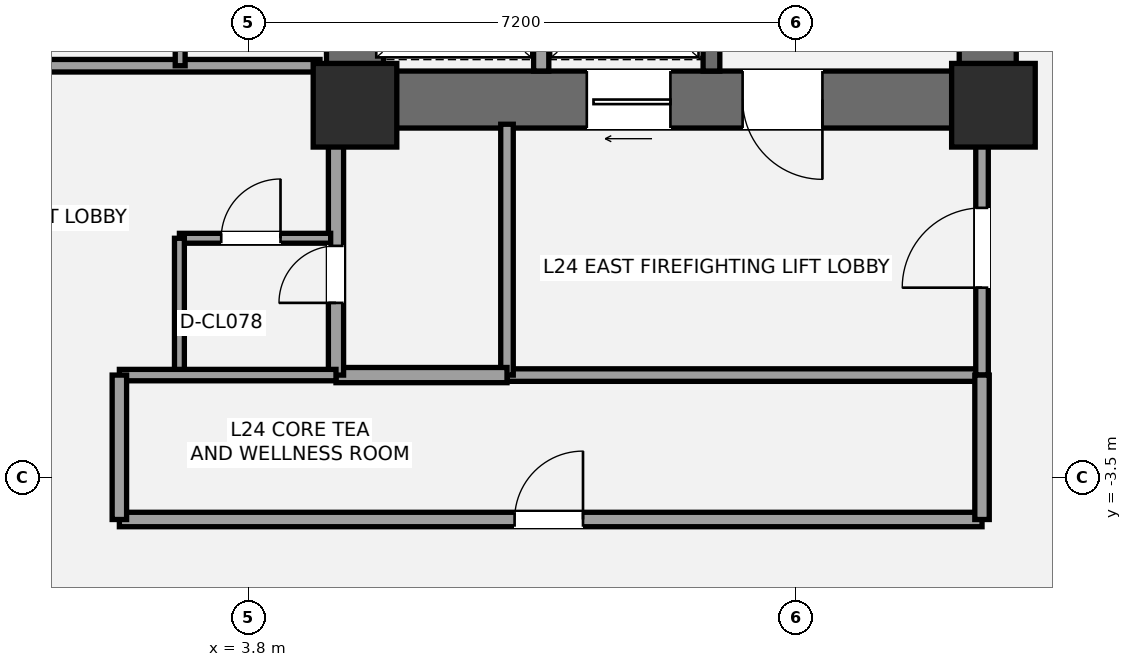
"""IFC4 building model, lengths in metres.
Left out: names, types, materials, properties, quantities, classifications, styles, units other than length and angle.
Written with IfcOpenShell. Run it as: python <this file> out.ifc"""

import sys

from ifc_helpers import new_model, si_unit, direction, frame, frame_2d, origin, origin_2d, place, context, subcontext, project, spatial, rectangle, extrude, element, fill, save


model = new_model("IFC4")
c1 = context("Model", 3, precision=1e-05, world=origin(), true_north=direction((0.0, 1.0)))
c2 = subcontext(c1, "Body", "Model", "MODEL_VIEW")
j1 = project(units=[si_unit("LENGTHUNIT", "METRE"), si_unit("PLANEANGLEUNIT", "RADIAN")], contexts=[c1])
p1 = place(None, origin())
s1 = spatial("IfcSite", under=j1, at=p1, CompositionType="ELEMENT")
p2 = place(p1, origin())
s2 = spatial("IfcBuilding", under=s1, at=p2, CompositionType="ELEMENT")
p3 = place(p2, frame((0.0, 0.0, 93.1)))
s3 = spatial("IfcBuildingStorey", under=s2, at=p3, CompositionType="ELEMENT", Elevation=93.1)
p4 = place(p3, frame((13.525, 1.1, 0.0), z_axis=(0.0, 0.0, 1.0), x_axis=(0.0, 1.0, 0.0)))
e1 = element("IfcWall", 1, at=p4, inside=s3, PredefinedType="SHEAR", context=c2, shape_type="SweptSolid", body=[
    extrude(rectangle(XDim=8.65, YDim=0.75, at=frame_2d((4.325, 0.0))), origin(), (0.0, 0.0, 1.0), 3.5),
])
p5 = place(p3, frame((13.9, 1.475, 0.0), z_axis=(0.0, 0.0, 1.0), x_axis=(-1.0, 0.0, 0.0)))
e2 = element("IfcWall", 2, at=p5, inside=s3, PredefinedType="SHEAR", context=c2, shape_type="SweptSolid", body=[
    extrude(rectangle(XDim=9.075, YDim=0.75, at=frame_2d((4.538, 0.0))), origin(), (0.0, 0.0, 1.0), 3.5),
])
p6 = place(p5, frame((2.55, 0.0, 0.0)))
e3 = element("IfcOpeningElement", 3, at=p6, cuts=e2, PredefinedType="OPENING", context=c2, shape_type="SweptSolid", body=[
    extrude(rectangle(XDim=1.05, YDim=2.15, at=frame_2d((0.525, 1.075))), frame((0.0, 0.385, 0.0), z_axis=(0.0, -1.0, 0.0), x_axis=(1.0, 0.0, 0.0)), (0.0, 0.0, 1.0), 0.77),
])
p7 = place(p5, frame((4.55, 0.0, 0.0)))
e4 = element("IfcOpeningElement", 4, at=p7, cuts=e2, PredefinedType="OPENING", context=c2, shape_type="SweptSolid", body=[
    extrude(rectangle(XDim=1.1, YDim=2.2, at=frame_2d((0.55, 1.1))), frame((0.0, 0.385, 0.0), z_axis=(0.0, -1.0, 0.0), x_axis=(1.0, 0.0, 0.0)), (0.0, 0.0, 1.0), 0.77),
])
p8 = place(p3, frame((5.2, 1.1, 0.0), z_axis=(0.0, 0.0, 1.0), x_axis=(0.0, 1.0, 0.0)))
e5 = element("IfcWall", 5, at=p8, inside=s3, PredefinedType="SHEAR", context=c2, shape_type="SweptSolid", body=[
    extrude(rectangle(XDim=2.7, YDim=0.75, at=frame_2d((1.35, 0.0))), origin(), (0.0, 0.0, 1.0), 3.5),
])
p9 = place(p3, frame((9.89, 1.85, 0.0), z_axis=(0.0, 0.0, 1.0), x_axis=(0.0, 1.0, 0.0)))
e6 = element("IfcWall", 6, at=p9, inside=s3, PredefinedType="SHEAR", context=c2, shape_type="SweptSolid", body=[
    extrude(rectangle(XDim=7.15, YDim=0.22, at=frame_2d((3.575, 0.0))), origin(), (0.0, 0.0, 1.0), 3.5),
])
for number, where, z_axis, x_axis in (
    (7, (5.2, 1.4, 0.0), (0.0, 0.0, 1.0), (1.0, 0.0, 0.0)),
    (8, (13.6, 1.4, 0.0), (0.0, 0.0, 1.0), (1.0, 0.0, 0.0)),
):
    element("IfcColumn", number, at=place(p3, frame(where, z_axis=z_axis, x_axis=x_axis)), inside=s3, PredefinedType="COLUMN", context=c2, shape_type="SweptSolid", body=[
        extrude(rectangle(XDim=1.1, YDim=1.1, at=origin_2d()), origin(), (0.0, 0.0, 1.0), 3.5),
    ])
p10 = place(p3, frame((7.2, -2.15, 0.0), z_axis=(0.0, 0.0, 1.0), x_axis=(1.0, 0.0, 0.0)))
e9 = element("IfcWall", 9, at=p10, inside=s3, PredefinedType="PARTITIONING", context=c2, shape_type="SweptSolid", body=[
    extrude(rectangle(XDim=6.25, YDim=0.165, at=frame_2d((3.125, 0.0))), origin(), (0.0, 0.0, 1.0), 3.31),
])
p11 = place(p3, frame((7.2, -2.15, 0.0), z_axis=(0.0, 0.0, 1.0), x_axis=(0.0, 1.0, 0.0)))
e10 = element("IfcWall", 10, at=p11, inside=s3, PredefinedType="PARTITIONING", context=c2, shape_type="SweptSolid", body=[
    extrude(rectangle(XDim=3.3, YDim=0.165, at=frame_2d((1.65, 0.0))), origin(), (0.0, 0.0, 1.0), 3.31),
])
p12 = place(p3, frame((13.45, -2.15, 0.0), z_axis=(0.0, 0.0, 1.0), x_axis=(0.0, 1.0, 0.0)))
e11 = element("IfcWall", 11, at=p12, inside=s3, PredefinedType="PARTITIONING", context=c2, shape_type="SweptSolid", body=[
    extrude(rectangle(XDim=3.3, YDim=0.165, at=frame_2d((1.65, 0.0))), origin(), (0.0, 0.0, 1.0), 2.763),
])
p13 = place(p12, frame((1.15, 0.0, 0.0)))
e12 = element("IfcOpeningElement", 12, at=p13, cuts=e11, PredefinedType="OPENING", context=c2, shape_type="SweptSolid", body=[
    extrude(rectangle(XDim=1.05, YDim=2.15, at=frame_2d((0.525, 1.075))), frame((0.0, 0.093, 0.0), z_axis=(0.0, -1.0, 0.0), x_axis=(1.0, 0.0, 0.0)), (0.0, 0.0, 1.0), 0.185),
])
p14 = place(p3, frame((4.95, -2.15, 0.0), z_axis=(0.0, 0.0, 1.0), x_axis=(1.0, 0.0, 0.0)))
e13 = element("IfcWall", 13, at=p14, inside=s3, PredefinedType="SOLIDWALL", context=c2, shape_type="SweptSolid", body=[
    extrude(rectangle(XDim=2.25, YDim=0.2, at=frame_2d((1.125, 0.0))), origin(), (0.0, 0.0, 1.0), 2.763),
])
p15 = place(p3, frame((4.95, -2.15, 0.0), z_axis=(0.0, 0.0, 1.0), x_axis=(0.0, 1.0, 0.0)))
e14 = element("IfcWall", 14, at=p15, inside=s3, PredefinedType="SOLIDWALL", context=c2, shape_type="SweptSolid", body=[
    extrude(rectangle(XDim=3.3, YDim=0.2, at=frame_2d((1.65, 0.0))), origin(), (0.0, 0.0, 1.0), 3.31),
])
p16 = place(p15, frame((0.95, 0.0, 0.0)))
e15 = element("IfcOpeningElement", 15, at=p16, cuts=e14, PredefinedType="OPENING", context=c2, shape_type="SweptSolid", body=[
    extrude(rectangle(XDim=0.75, YDim=2.1, at=frame_2d((0.375, 1.05))), frame((0.0, 0.11, 0.0), z_axis=(0.0, -1.0, 0.0), x_axis=(1.0, 0.0, 0.0)), (0.0, 0.0, 1.0), 0.22),
])
p17 = place(p3, frame((2.89, -0.35, 0.0), z_axis=(0.0, 0.0, 1.0), x_axis=(1.0, 0.0, 0.0)))
e16 = element("IfcWall", 16, at=p17, inside=s3, PredefinedType="PARTITIONING", context=c2, shape_type="SweptSolid", body=[
    extrude(rectangle(XDim=1.99, YDim=0.13, at=frame_2d((0.995, 0.0))), origin(), (0.0, 0.0, 1.0), 3.31),
])
p18 = place(p17, frame((0.55, 0.0, 0.0)))
e17 = element("IfcOpeningElement", 17, at=p18, cuts=e16, PredefinedType="OPENING", context=c2, shape_type="SweptSolid", body=[
    extrude(rectangle(XDim=0.78, YDim=2.1, at=frame_2d((0.39, 1.05))), frame((0.0, 0.075, 0.0), z_axis=(0.0, -1.0, 0.0), x_axis=(1.0, 0.0, 0.0)), (0.0, 0.0, 1.0), 0.15),
])
p19 = place(p3, frame((2.89, -2.15, 0.0), z_axis=(0.0, 0.0, 1.0), x_axis=(0.0, 1.0, 0.0)))
e18 = element("IfcWall", 18, at=p19, inside=s3, PredefinedType="PARTITIONING", context=c2, shape_type="SweptSolid", body=[
    extrude(rectangle(XDim=1.8, YDim=0.13, at=frame_2d((0.9, 0.0))), origin(), (0.0, 0.0, 1.0), 3.31),
])
p20 = place(p3, frame((7.65, 1.85, 0.0), z_axis=(0.0, 0.0, 1.0), x_axis=(0.0, 1.0, 0.0)))
e19 = element("IfcWall", 19, at=p20, inside=s3, PredefinedType="SOLIDWALL", context=c2, shape_type="SweptSolid", body=[
    extrude(rectangle(XDim=1.97, YDim=0.2, at=frame_2d((0.985, 0.0))), origin(), (0.0, 0.0, 1.0), 3.31),
])
p21 = place(p3, frame((0.85, 1.92, 0.0), z_axis=(0.0, 0.0, 1.0), x_axis=(1.0, 0.0, 0.0)))
e20 = element("IfcWall", 20, at=p21, inside=s3, PredefinedType="PARTITIONING", context=c2, shape_type="SweptSolid", body=[
    extrude(rectangle(XDim=3.89, YDim=0.165, at=frame_2d((1.945, 0.0))), origin(), (0.0, 0.0, 1.0), 2.3),
])
p22 = place(p3, frame((2.9, 1.92, 0.0), z_axis=(0.0, 0.0, 1.0), x_axis=(0.0, 1.0, 0.0)))
e21 = element("IfcWall", 21, at=p22, inside=s3, PredefinedType="PARTITIONING", context=c2, shape_type="SweptSolid", body=[
    extrude(rectangle(XDim=1.82, YDim=0.13, at=frame_2d((0.91, 0.0))), origin(), (0.0, 0.0, 1.0), 3.31),
])
p23 = place(p3, frame((2.1, -4.05, 0.0), z_axis=(0.0, 0.0, 1.0), x_axis=(1.0, 0.0, 0.0)))
e22 = element("IfcWall", 22, at=p23, inside=s3, PredefinedType="PLUMBINGWALL", context=c2, shape_type="SweptSolid", body=[
    extrude(rectangle(XDim=11.35, YDim=0.19, at=frame_2d((5.675, 0.0))), origin(), (0.0, 0.0, 1.0), 2.763),
])
p24 = place(p23, frame((5.2, 0.0, 0.0)))
e23 = element("IfcOpeningElement", 23, at=p24, cuts=e22, PredefinedType="OPENING", context=c2, shape_type="SweptSolid", body=[
    extrude(rectangle(XDim=0.9, YDim=2.1, at=frame_2d((0.45, 1.05))), frame((0.0, 0.105, 0.0), z_axis=(0.0, -1.0, 0.0), x_axis=(1.0, 0.0, 0.0)), (0.0, 0.0, 1.0), 0.21),
])
p25 = place(p3, frame((2.1, -2.15, 0.0), z_axis=(0.0, 0.0, 1.0), x_axis=(1.0, 0.0, 0.0)))
e24 = element("IfcWall", 24, at=p25, inside=s3, PredefinedType="PLUMBINGWALL", context=c2, shape_type="SweptSolid", body=[
    extrude(rectangle(XDim=2.85, YDim=0.15, at=frame_2d((1.425, 0.0))), origin(), (0.0, 0.0, 1.0), 2.763),
])
p26 = place(p3, frame((2.1, -4.05, 0.0), z_axis=(0.0, 0.0, 1.0), x_axis=(0.0, 1.0, 0.0)))
e25 = element("IfcWall", 25, at=p26, inside=s3, PredefinedType="PLUMBINGWALL", context=c2, shape_type="SweptSolid", body=[
    extrude(rectangle(XDim=1.9, YDim=0.19, at=frame_2d((0.95, 0.0))), origin(), (0.0, 0.0, 1.0), 3.31),
])
p27 = place(p3, frame((13.45, -4.05, 0.0), z_axis=(0.0, 0.0, 1.0), x_axis=(0.0, 1.0, 0.0)))
e26 = element("IfcWall", 26, at=p27, inside=s3, PredefinedType="PLUMBINGWALL", context=c2, shape_type="SweptSolid", body=[
    extrude(rectangle(XDim=1.9, YDim=0.19, at=frame_2d((0.95, 0.0))), origin(), (0.0, 0.0, 1.0), 2.763),
])
p28 = place(p6, origin())
e27 = element("IfcDoor", 27, at=p28, inside=s3, OperationType="SINGLE_SWING_LEFT", PredefinedType="DOOR", context=c2, shape_type="SweptSolid", body=[
    extrude(rectangle(XDim=1.05, YDim=2.15, at=frame_2d((0.525, 1.075))), frame((0.0, 0.025, 0.0), z_axis=(0.0, -1.0, 0.0), x_axis=(1.0, 0.0, 0.0)), (0.0, 0.0, 1.0), 0.05),
])
fill(e3, e27)
p29 = place(p13, origin())
e28 = element("IfcDoor", 28, at=p29, inside=s3, OperationType="SINGLE_SWING_LEFT", PredefinedType="DOOR", context=c2, shape_type="SweptSolid", body=[
    extrude(rectangle(XDim=1.05, YDim=2.15, at=frame_2d((0.525, 1.075))), frame((0.0, 0.025, 0.0), z_axis=(0.0, -1.0, 0.0), x_axis=(1.0, 0.0, 0.0)), (0.0, 0.0, 1.0), 0.05),
])
fill(e12, e28)
p30 = place(p16, origin())
e29 = element("IfcDoor", 29, at=p30, inside=s3, OperationType="SINGLE_SWING_LEFT", PredefinedType="DOOR", context=c2, shape_type="SweptSolid", body=[
    extrude(rectangle(XDim=0.75, YDim=2.1, at=frame_2d((0.375, 1.05))), frame((0.0, 0.025, 0.0), z_axis=(0.0, -1.0, 0.0), x_axis=(1.0, 0.0, 0.0)), (0.0, 0.0, 1.0), 0.05),
])
fill(e15, e29)
p31 = place(p18, origin())
e30 = element("IfcDoor", 30, at=p31, inside=s3, OperationType="SINGLE_SWING_RIGHT", PredefinedType="DOOR", context=c2, shape_type="SweptSolid", body=[
    extrude(rectangle(XDim=0.78, YDim=2.1, at=frame_2d((0.39, 1.05))), frame((0.0, 0.025, 0.0), z_axis=(0.0, -1.0, 0.0), x_axis=(1.0, 0.0, 0.0)), (0.0, 0.0, 1.0), 0.05),
])
fill(e17, e30)
p32 = place(p7, origin())
e31 = element("IfcDoor", 31, at=p32, inside=s3, OperationType="SLIDING_TO_LEFT", PredefinedType="DOOR", context=c2, shape_type="SweptSolid", body=[
    extrude(rectangle(XDim=1.1, YDim=2.2, at=frame_2d((0.55, 1.1))), frame((0.0, 0.025, 0.0), z_axis=(0.0, -1.0, 0.0), x_axis=(1.0, 0.0, 0.0)), (0.0, 0.0, 1.0), 0.05),
])
fill(e4, e31)
p33 = place(p24, origin())
e32 = element("IfcDoor", 32, at=p33, inside=s3, OperationType="SINGLE_SWING_RIGHT", PredefinedType="DOOR", context=c2, shape_type="SweptSolid", body=[
    extrude(rectangle(XDim=0.9, YDim=2.1, at=frame_2d((0.45, 1.05))), frame((0.0, 0.025, 0.0), z_axis=(0.0, -1.0, 0.0), x_axis=(1.0, 0.0, 0.0)), (0.0, 0.0, 1.0), 0.05),
])
fill(e23, e32)
save(model, sys.argv[1])
